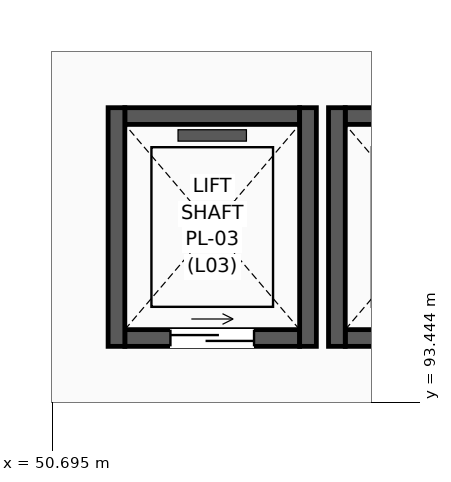
"""IFC4 building model, lengths in metres.
Left out: names, types, materials, properties, quantities, classifications, styles, units other than length and angle.
Written with IfcOpenShell. Run it as: python <this file> out.ifc"""

import sys

from ifc_helpers import new_model, si_unit, direction, frame, frame_2d, origin, place, context, subcontext, project, spatial, rectangle, extrude, element, fill, save


model = new_model("IFC4")
c1 = context("Model", 3, precision=1e-05, world=origin(), true_north=direction((0.0, 1.0)))
c2 = subcontext(c1, "Body", "Model", "MODEL_VIEW")
j1 = project(units=[si_unit("LENGTHUNIT", "METRE"), si_unit("PLANEANGLEUNIT", "RADIAN")], contexts=[c1])
p1 = place(None, origin())
s1 = spatial("IfcSite", under=j1, at=p1, CompositionType="ELEMENT")
p2 = place(p1, origin())
s2 = spatial("IfcBuilding", under=s1, at=p2, CompositionType="ELEMENT")
p3 = place(p2, frame((0.0, 0.0, 14.7)))
s3 = spatial("IfcBuildingStorey", under=s2, at=p3, CompositionType="ELEMENT", Elevation=14.7)
p4 = place(p3, frame((51.65, 94.29, 0.0), z_axis=(0.0, 0.0, 1.0), x_axis=(1.0, 0.0, 0.0)))
e1 = element("IfcWall", 1, at=p4, inside=s3, PredefinedType="SOLIDWALL", context=c2, shape_type="SweptSolid", body=[
    extrude(rectangle(XDim=2.3, YDim=0.22, at=frame_2d((1.15, 0.0))), origin(), (0.0, 0.0, 1.0), 4.245),
])
p5 = place(p4, frame((0.6, 0.0, 0.0)))
e2 = element("IfcOpeningElement", 2, at=p5, cuts=e1, PredefinedType="OPENING", context=c2, shape_type="SweptSolid", body=[
    extrude(rectangle(XDim=1.1, YDim=2.2, at=frame_2d((0.55, 1.1))), frame((0.0, 0.12, 0.0), z_axis=(0.0, -1.0, 0.0), x_axis=(1.0, 0.0, 0.0)), (0.0, 0.0, 1.0), 0.24),
])
p6 = place(p3, frame((51.65, 97.21, 0.0), z_axis=(0.0, 0.0, 1.0), x_axis=(1.0, 0.0, 0.0)))
e3 = element("IfcWall", 3, at=p6, inside=s3, PredefinedType="SOLIDWALL", context=c2, shape_type="SweptSolid", body=[
    extrude(rectangle(XDim=2.3, YDim=0.22, at=frame_2d((1.15, 0.0))), origin(), (0.0, 0.0, 1.0), 4.245),
])
for number, where, z_axis, x_axis in (
    (4, (51.54, 94.18, 0.0), (0.0, 0.0, 1.0), (0.0, 1.0, 0.0)),
    (5, (54.06, 94.18, 0.0), (0.0, 0.0, 1.0), (0.0, 1.0, 0.0)),
):
    element("IfcWall", number, at=place(p3, frame(where, z_axis=z_axis, x_axis=x_axis)), inside=s3, PredefinedType="SOLIDWALL", context=c2, shape_type="SweptSolid", body=[
        extrude(rectangle(XDim=3.14, YDim=0.22, at=frame_2d((1.57, 0.0))), origin(), (0.0, 0.0, 1.0), 4.245),
    ])
p7 = place(p3, frame((54.55, 94.29, 0.0), z_axis=(0.0, 0.0, 1.0), x_axis=(1.0, 0.0, 0.0)))
e6 = element("IfcWall", 6, at=p7, inside=s3, PredefinedType="SOLIDWALL", context=c2, shape_type="SweptSolid", body=[
    extrude(rectangle(XDim=2.3, YDim=0.22, at=frame_2d((1.15, 0.0))), origin(), (0.0, 0.0, 1.0), 4.245),
])
p8 = place(p7, frame((0.6, 0.0, 0.0)))
e7 = element("IfcOpeningElement", 7, at=p8, cuts=e6, PredefinedType="OPENING", context=c2, shape_type="SweptSolid", body=[
    extrude(rectangle(XDim=1.1, YDim=2.2, at=frame_2d((0.55, 1.1))), frame((0.0, 0.12, 0.0), z_axis=(0.0, -1.0, 0.0), x_axis=(1.0, 0.0, 0.0)), (0.0, 0.0, 1.0), 0.24),
])
p9 = place(p3, frame((54.55, 97.21, 0.0), z_axis=(0.0, 0.0, 1.0), x_axis=(1.0, 0.0, 0.0)))
e8 = element("IfcWall", 8, at=p9, inside=s3, PredefinedType="SOLIDWALL", context=c2, shape_type="SweptSolid", body=[
    extrude(rectangle(XDim=2.3, YDim=0.22, at=frame_2d((1.15, 0.0))), origin(), (0.0, 0.0, 1.0), 4.245),
])
p10 = place(p3, frame((54.44, 94.18, 0.0), z_axis=(0.0, 0.0, 1.0), x_axis=(0.0, 1.0, 0.0)))
e9 = element("IfcWall", 9, at=p10, inside=s3, PredefinedType="SOLIDWALL", context=c2, shape_type="SweptSolid", body=[
    extrude(rectangle(XDim=3.14, YDim=0.22, at=frame_2d((1.57, 0.0))), origin(), (0.0, 0.0, 1.0), 4.245),
])
p11 = place(p5, origin())
e10 = element("IfcDoor", 10, at=p11, inside=s3, OperationType="SLIDING_TO_LEFT", PredefinedType="DOOR", context=c2, shape_type="SweptSolid", body=[
    extrude(rectangle(XDim=1.1, YDim=2.2, at=frame_2d((0.55, 1.1))), frame((0.0, 0.025, 0.0), z_axis=(0.0, -1.0, 0.0), x_axis=(1.0, 0.0, 0.0)), (0.0, 0.0, 1.0), 0.05),
])
fill(e2, e10)
save(model, sys.argv[1])
